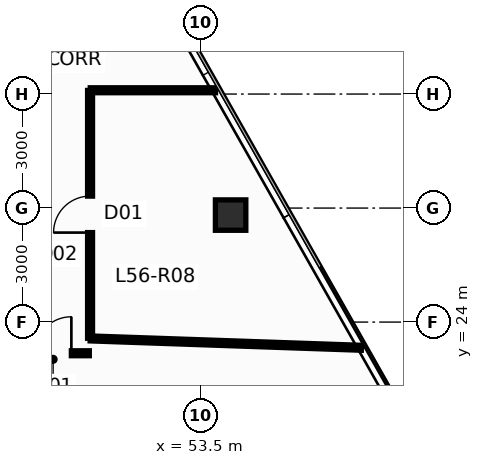
"""IFC4 building model, lengths in metres.
Left out: names, types, materials, properties, quantities, classifications, styles, units other than length and angle.
Written with IfcOpenShell. Run it as: python <this file> out.ifc"""

import sys

from ifc_helpers import new_model, si_unit, direction, frame, frame_2d, origin, origin_2d, place, context, subcontext, project, spatial, rectangle, hollow_rectangle, extrude, source, transform, mapped, element, fill, save


model = new_model("IFC4")
c1 = context("Model", 3, precision=1e-05, world=origin(), true_north=direction((0.0, 1.0)))
c2 = subcontext(c1, "Body", "Model", "MODEL_VIEW")
j1 = project(units=[si_unit("LENGTHUNIT", "METRE"), si_unit("PLANEANGLEUNIT", "RADIAN")], contexts=[c1])
p1 = place(None, origin())
s1 = spatial("IfcSite", under=j1, at=p1, CompositionType="ELEMENT")
p2 = place(p1, origin())
s2 = spatial("IfcBuilding", under=s1, at=p2, CompositionType="ELEMENT")
p3 = place(p2, frame((0.0, 0.0, 213.25)))
s3 = spatial("IfcBuildingStorey", under=s2, at=p3, CompositionType="ELEMENT", Elevation=213.25)
m1 = source(origin(), c2, "Body", "SweptSolid", [
    extrude(hollow_rectangle(XDim=0.8, YDim=0.8, WallThickness=0.045, at=origin_2d()), origin(), (0.0, 0.0, 1.0), 3.651),
])
p4 = place(p3, frame((54.299, 26.816, 0.0), z_axis=(-0.014913313399, -0.013776424037, 0.999793880369), x_axis=(0.678553674548, -0.734550822447, 0.0)))
e1 = element("IfcColumn", 1, at=p4, inside=s3, PredefinedType="COLUMN", context=c2, shape_type="MappedRepresentation", body=[
    mapped(m1, transform((0.0, 0.0, 0.0), scale=1.0)),
])
p5 = place(p3, frame((50.605, 23.57, 0.0), z_axis=(0.0, 0.0, 1.0), x_axis=(0.999404577066, -0.034503497511, 0.0)))
e2 = element("IfcWall", 2, at=p5, inside=s3, PredefinedType="PARTITIONING", context=c2, shape_type="SweptSolid", body=[
    extrude(rectangle(XDim=7.139, YDim=0.13, at=frame_2d((3.57, 0.0))), origin(), (0.0, 0.0, 1.0), 3.4),
])
p6 = place(p3, frame((50.6, 23.575, 0.0), z_axis=(0.0, 0.0, 1.0), x_axis=(0.0, 1.0, 0.0)))
e3 = element("IfcWall", 3, at=p6, inside=s3, PredefinedType="PARTITIONING", context=c2, shape_type="SweptSolid", body=[
    extrude(rectangle(XDim=6.52, YDim=0.13, at=frame_2d((3.26, 0.0))), origin(), (0.0, 0.0, 1.0), 3.078),
])
p7 = place(p6, frame((2.78, 0.0, 0.0)))
e4 = element("IfcOpeningElement", 4, at=p7, cuts=e3, PredefinedType="OPENING", context=c2, shape_type="SweptSolid", body=[
    extrude(rectangle(XDim=0.96, YDim=2.15, at=frame_2d((0.48, 1.075))), frame((0.0, 0.077, 0.0), z_axis=(0.0, -1.0, 0.0), x_axis=(1.0, 0.0, 0.0)), (0.0, 0.0, 1.0), 0.154),
])
p8 = place(p3, frame((50.605, 30.1, 0.0), z_axis=(0.0, 0.0, 1.0), x_axis=(1.0, 0.0, 0.0)))
e5 = element("IfcWall", 5, at=p8, inside=s3, PredefinedType="PARTITIONING", context=c2, shape_type="SweptSolid", body=[
    extrude(rectangle(XDim=3.296, YDim=0.13, at=frame_2d((1.648, 0.0))), origin(), (0.0, 0.0, 1.0), 3.4),
])
p9 = place(p3, frame((48.675, 23.18, 0.0), z_axis=(0.0, 0.0, 1.0), x_axis=(1.0, 0.0, 0.0)))
e6 = element("IfcWall", 6, at=p9, inside=s3, PredefinedType="PARTITIONING", context=c2, shape_type="SweptSolid", body=[
    extrude(rectangle(XDim=1.905, YDim=0.13, at=frame_2d((0.953, 0.0))), origin(), (0.0, 0.0, 1.0), 3.4),
])
p10 = place(p9, frame((0.473, 0.0, 0.0)))
e7 = element("IfcOpeningElement", 7, at=p10, cuts=e6, PredefinedType="OPENING", context=c2, shape_type="SweptSolid", body=[
    extrude(rectangle(XDim=0.96, YDim=2.15, at=frame_2d((0.48, 1.075))), frame((0.0, 0.077, 0.0), z_axis=(0.0, -1.0, 0.0), x_axis=(1.0, 0.0, 0.0)), (0.0, 0.0, 1.0), 0.154),
])
p11 = place(p7, origin())
e8 = element("IfcDoor", 8, at=p11, inside=s3, OperationType="SINGLE_SWING_LEFT", PredefinedType="DOOR", context=c2, shape_type="SweptSolid", body=[
    extrude(rectangle(XDim=0.96, YDim=2.15, at=frame_2d((0.48, 1.075))), frame((0.0, 0.025, 0.0), z_axis=(0.0, -1.0, 0.0), x_axis=(1.0, 0.0, 0.0)), (0.0, 0.0, 1.0), 0.05),
])
fill(e4, e8)
p12 = place(p10, origin())
e9 = element("IfcDoor", 9, at=p12, inside=s3, OperationType="SINGLE_SWING_RIGHT", PredefinedType="DOOR", context=c2, shape_type="SweptSolid", body=[
    extrude(rectangle(XDim=0.96, YDim=2.15, at=frame_2d((0.48, 1.075))), frame((0.0, 0.025, 0.0), z_axis=(0.0, -1.0, 0.0), x_axis=(1.0, 0.0, 0.0)), (0.0, 0.0, 1.0), 0.05),
])
fill(e7, e9)
save(model, sys.argv[1])
